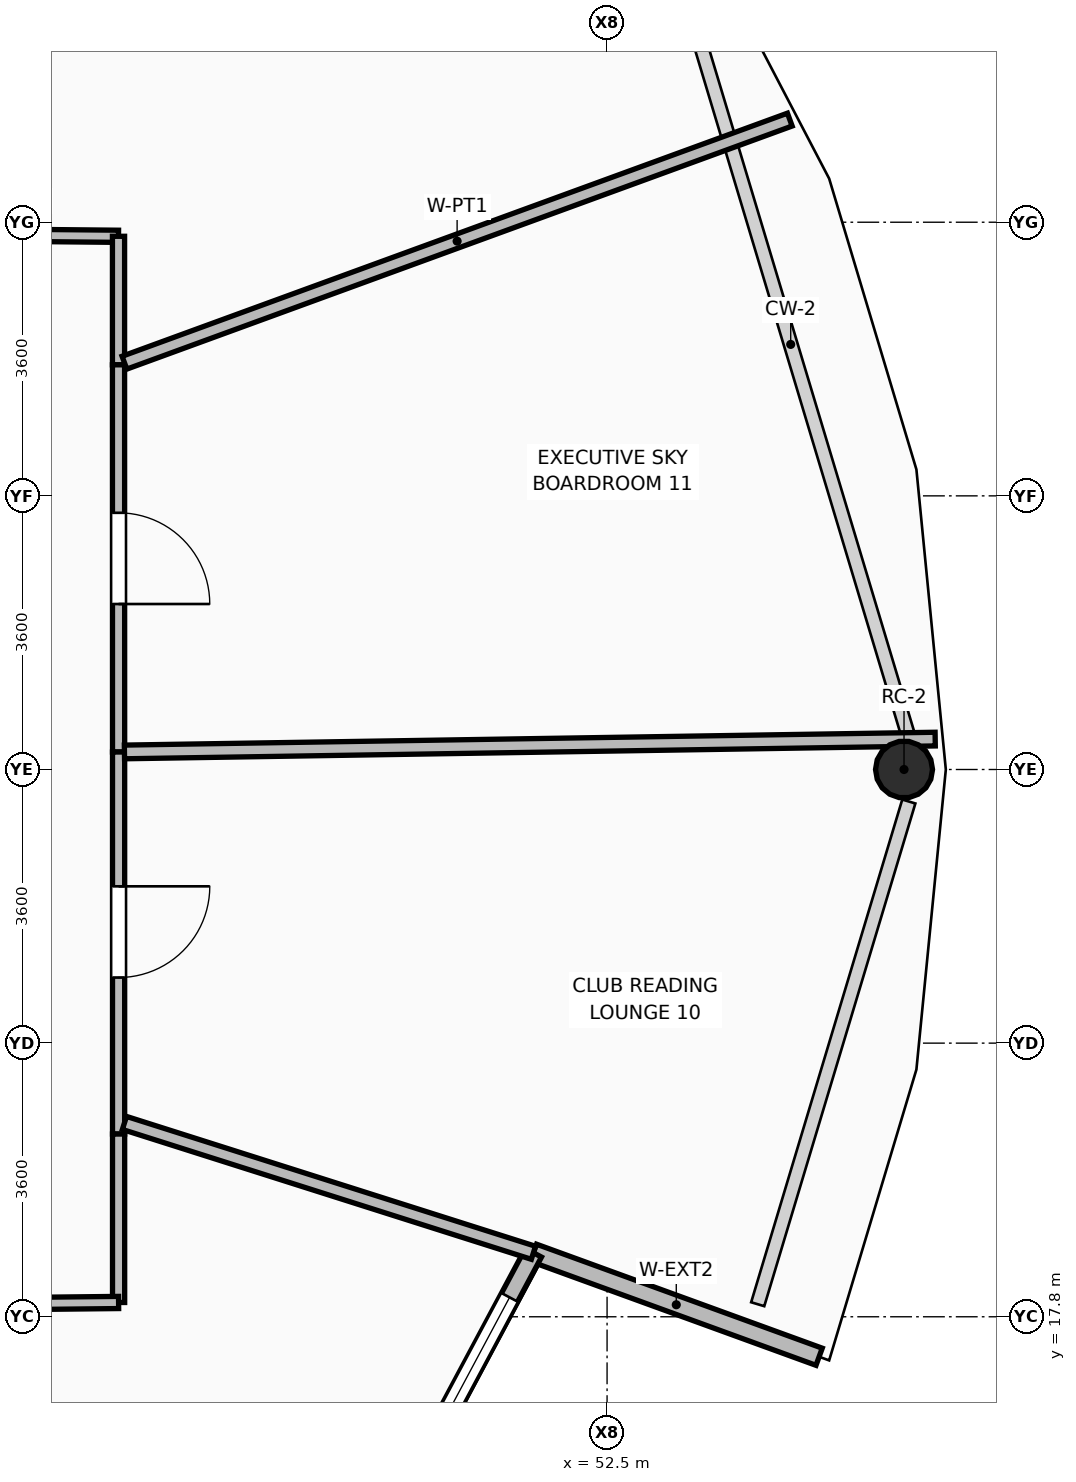
"""IFC4 building model, lengths in metres.
Left out: names, types, materials, properties, quantities, classifications, styles, units other than length and angle.
Written with IfcOpenShell. Run it as: python <this file> out.ifc"""

import sys

from ifc_helpers import new_model, si_unit, direction, frame, frame_2d, origin, origin_2d, place, context, subcontext, project, spatial, rectangle, hollow_circle, extrude, element, fill, save


model = new_model("IFC4")
c1 = context("Model", 3, precision=1e-05, world=origin(), true_north=direction((0.0, 1.0)))
c2 = subcontext(c1, "Body", "Model", "MODEL_VIEW")
j1 = project(units=[si_unit("LENGTHUNIT", "METRE"), si_unit("PLANEANGLEUNIT", "RADIAN")], contexts=[c1])
p1 = place(None, origin())
s1 = spatial("IfcSite", under=j1, at=p1, CompositionType="ELEMENT")
p2 = place(p1, origin())
s2 = spatial("IfcBuilding", under=s1, at=p2, CompositionType="ELEMENT")
p3 = place(p2, frame((0.0, 0.0, 142.2)))
s3 = spatial("IfcBuildingStorey", under=s2, at=p3, CompositionType="ELEMENT", Elevation=142.2)
p4 = place(p3, frame((56.407, 25.0, 0.0), z_axis=(-0.017367276966, 0.0, 0.999849177472), x_axis=(0.0, -1.0, 0.0)))
e1 = element("IfcColumn", 1, at=p4, inside=s3, PredefinedType="COLUMN", context=c2, shape_type="SweptSolid", body=[
    extrude(hollow_circle(Radius=0.375, WallThickness=0.035, at=origin_2d()), origin(), (0.0, 0.0, 1.0), 3.571),
])
p5 = place(p3, frame((51.531, 18.642, 0.0), z_axis=(0.0, 0.0, 1.0), x_axis=(0.939693595587, -0.342017465069, 0.0)))
e2 = element("IfcWall", 2, at=p5, inside=s3, PredefinedType="SOLIDWALL", context=c2, shape_type="SweptSolid", body=[
    extrude(rectangle(XDim=4.0, YDim=0.24, at=frame_2d((2.0, 0.0))), origin(), (0.0, 0.0, 1.0), 3.57),
])
p6 = place(p3, frame((49.961, 15.705, 0.0), z_axis=(0.0, 0.0, 1.0), x_axis=(0.471444120002, 0.881895935877, 0.0)))
e3 = element("IfcWall", 3, at=p6, inside=s3, PredefinedType="SOLIDWALL", context=c2, shape_type="SweptSolid", body=[
    extrude(rectangle(XDim=3.33, YDim=0.24, at=frame_2d((1.665, 0.0))), origin(), (0.0, 0.0, 1.0), 3.57),
])
p7 = place(p6, frame((0.665, 0.0, 0.85)))
e4 = element("IfcOpeningElement", 4, at=p7, cuts=e3, PredefinedType="OPENING", context=c2, shape_type="SweptSolid", body=[
    extrude(rectangle(XDim=2.0, YDim=2.4, at=frame_2d((1.0, 1.2))), frame((0.0, 0.13, 0.0), z_axis=(0.0, -1.0, 0.0), x_axis=(1.0, 0.0, 0.0)), (0.0, 0.0, 1.0), 0.26),
])
p8 = place(p3, frame((43.465, 32.04, 0.0), z_axis=(0.0, 0.0, 1.0), x_axis=(0.999953480577, -0.009645552397, 0.0)))
e5 = element("IfcWall", 5, at=p8, inside=s3, PredefinedType="PARTITIONING", context=c2, shape_type="SweptSolid", body=[
    extrude(rectangle(XDim=2.607, YDim=0.16, at=frame_2d((1.303, 0.0))), origin(), (0.0, 0.0, 1.0), 3.55),
])
p9 = place(p3, frame((46.072, 32.015, 0.0), z_axis=(0.0, 0.0, 1.0), x_axis=(0.0, -1.0, 0.0)))
e6 = element("IfcWall", 6, at=p9, inside=s3, PredefinedType="PARTITIONING", context=c2, shape_type="SweptSolid", body=[
    extrude(rectangle(XDim=1.691, YDim=0.16, at=frame_2d((0.845, 0.0))), origin(), (0.0, 0.0, 1.0), 3.55),
])
p10 = place(p3, frame((46.072, 30.324, 0.0), z_axis=(0.0, 0.0, 1.0), x_axis=(0.000191708599, -0.999999981624, 0.0)))
e7 = element("IfcWall", 7, at=p10, inside=s3, PredefinedType="PARTITIONING", context=c2, shape_type="SweptSolid", body=[
    extrude(rectangle(XDim=5.094, YDim=0.16, at=frame_2d((2.547, 0.0))), origin(), (0.0, 0.0, 1.0), 3.55),
])
p11 = place(p10, frame((1.947, 0.0, 0.0)))
e8 = element("IfcOpeningElement", 8, at=p11, cuts=e7, PredefinedType="OPENING", context=c2, shape_type="SweptSolid", body=[
    extrude(rectangle(XDim=1.2, YDim=2.1, at=frame_2d((0.6, 1.05))), frame((0.0, 0.09, 0.0), z_axis=(0.0, -1.0, 0.0), x_axis=(1.0, 0.0, 0.0)), (0.0, 0.0, 1.0), 0.18),
])
p12 = place(p3, frame((46.073, 25.23, 0.0), z_axis=(0.0, 0.0, 1.0), x_axis=(0.0, -1.0, 0.0)))
e9 = element("IfcWall", 9, at=p12, inside=s3, PredefinedType="PARTITIONING", context=c2, shape_type="SweptSolid", body=[
    extrude(rectangle(XDim=5.026, YDim=0.16, at=frame_2d((2.513, 0.0))), origin(), (0.0, 0.0, 1.0), 3.006),
])
p13 = place(p12, frame((1.767, 0.0, 0.0)))
e10 = element("IfcOpeningElement", 10, at=p13, cuts=e9, PredefinedType="OPENING", context=c2, shape_type="SweptSolid", body=[
    extrude(rectangle(XDim=1.2, YDim=2.1, at=frame_2d((0.6, 1.05))), frame((0.0, 0.09, 0.0), z_axis=(0.0, -1.0, 0.0), x_axis=(1.0, 0.0, 0.0)), (0.0, 0.0, 1.0), 0.18),
])
p14 = place(p3, frame((46.073, 20.204, 0.0), z_axis=(0.0, 0.0, 1.0), x_axis=(0.0, -1.0, 0.0)))
e11 = element("IfcWall", 11, at=p14, inside=s3, PredefinedType="PARTITIONING", context=c2, shape_type="SweptSolid", body=[
    extrude(rectangle(XDim=2.216, YDim=0.16, at=frame_2d((1.108, 0.0))), origin(), (0.0, 0.0, 1.0), 3.55),
])
p15 = place(p3, frame((46.073, 17.988, 0.0), z_axis=(0.0, 0.0, 1.0), x_axis=(-0.99994205409, -0.010765150367, 0.0)))
e12 = element("IfcWall", 12, at=p15, inside=s3, PredefinedType="PARTITIONING", context=c2, shape_type="SweptSolid", body=[
    extrude(rectangle(XDim=2.608, YDim=0.16, at=frame_2d((1.304, 0.0))), origin(), (0.0, 0.0, 1.0), 3.55),
])
p16 = place(p3, frame((46.15, 30.352, 0.0), z_axis=(0.0, 0.0, 1.0), x_axis=(0.939286843925, 0.343132955032, 0.0)))
e13 = element("IfcWall", 13, at=p16, inside=s3, PredefinedType="PARTITIONING", context=c2, shape_type="SweptSolid", body=[
    extrude(rectangle(XDim=9.32, YDim=0.18, at=frame_2d((4.66, 0.0))), origin(), (0.0, 0.0, 1.0), 2.852),
])
p17 = place(p3, frame((46.15, 20.35, 0.0), z_axis=(0.0, 0.0, 1.0), x_axis=(0.953138519051, -0.302534235256, 0.0)))
e14 = element("IfcWall", 14, at=p17, inside=s3, PredefinedType="PARTITIONING", context=c2, shape_type="SweptSolid", body=[
    extrude(rectangle(XDim=5.646, YDim=0.18, at=frame_2d((2.823, 0.0))), origin(), (0.0, 0.0, 1.0), 3.55),
])
p18 = place(p3, frame((46.15, 25.231, 0.0), z_axis=(0.0, 0.0, 1.0), x_axis=(0.999874600257, 0.015836153607, 0.0)))
e15 = element("IfcWall", 15, at=p18, inside=s3, PredefinedType="PARTITIONING", context=c2, shape_type="SweptSolid", body=[
    extrude(rectangle(XDim=10.668, YDim=0.18, at=frame_2d((5.334, 0.0))), origin(), (0.0, 0.0, 1.0), 2.852),
])
p19 = place(p7, origin())
e16 = element("IfcWindow", 16, at=p19, inside=s3, PartitioningType="SINGLE_PANEL", PredefinedType="WINDOW", context=c2, shape_type="SweptSolid", body=[
    extrude(rectangle(XDim=2.0, YDim=2.4, at=frame_2d((1.0, 1.2))), frame((0.0, 0.03, 0.0), z_axis=(0.0, -1.0, 0.0), x_axis=(1.0, 0.0, 0.0)), (0.0, 0.0, 1.0), 0.06),
])
fill(e4, e16)
p20 = place(p13, origin())
e17 = element("IfcDoor", 17, at=p20, inside=s3, OperationType="SINGLE_SWING_LEFT", PredefinedType="DOOR", context=c2, shape_type="SweptSolid", body=[
    extrude(rectangle(XDim=1.2, YDim=2.1, at=frame_2d((0.6, 1.05))), frame((0.0, 0.025, 0.0), z_axis=(0.0, -1.0, 0.0), x_axis=(1.0, 0.0, 0.0)), (0.0, 0.0, 1.0), 0.05),
])
fill(e10, e17)
p21 = place(p11, origin())
e18 = element("IfcDoor", 18, at=p21, inside=s3, OperationType="SINGLE_SWING_RIGHT", PredefinedType="DOOR", context=c2, shape_type="SweptSolid", body=[
    extrude(rectangle(XDim=1.2, YDim=2.1, at=frame_2d((0.6, 1.05))), frame((0.0, 0.025, 0.0), z_axis=(0.0, -1.0, 0.0), x_axis=(1.0, 0.0, 0.0)), (0.0, 0.0, 1.0), 0.05),
])
fill(e8, e18)
save(model, sys.argv[1])
